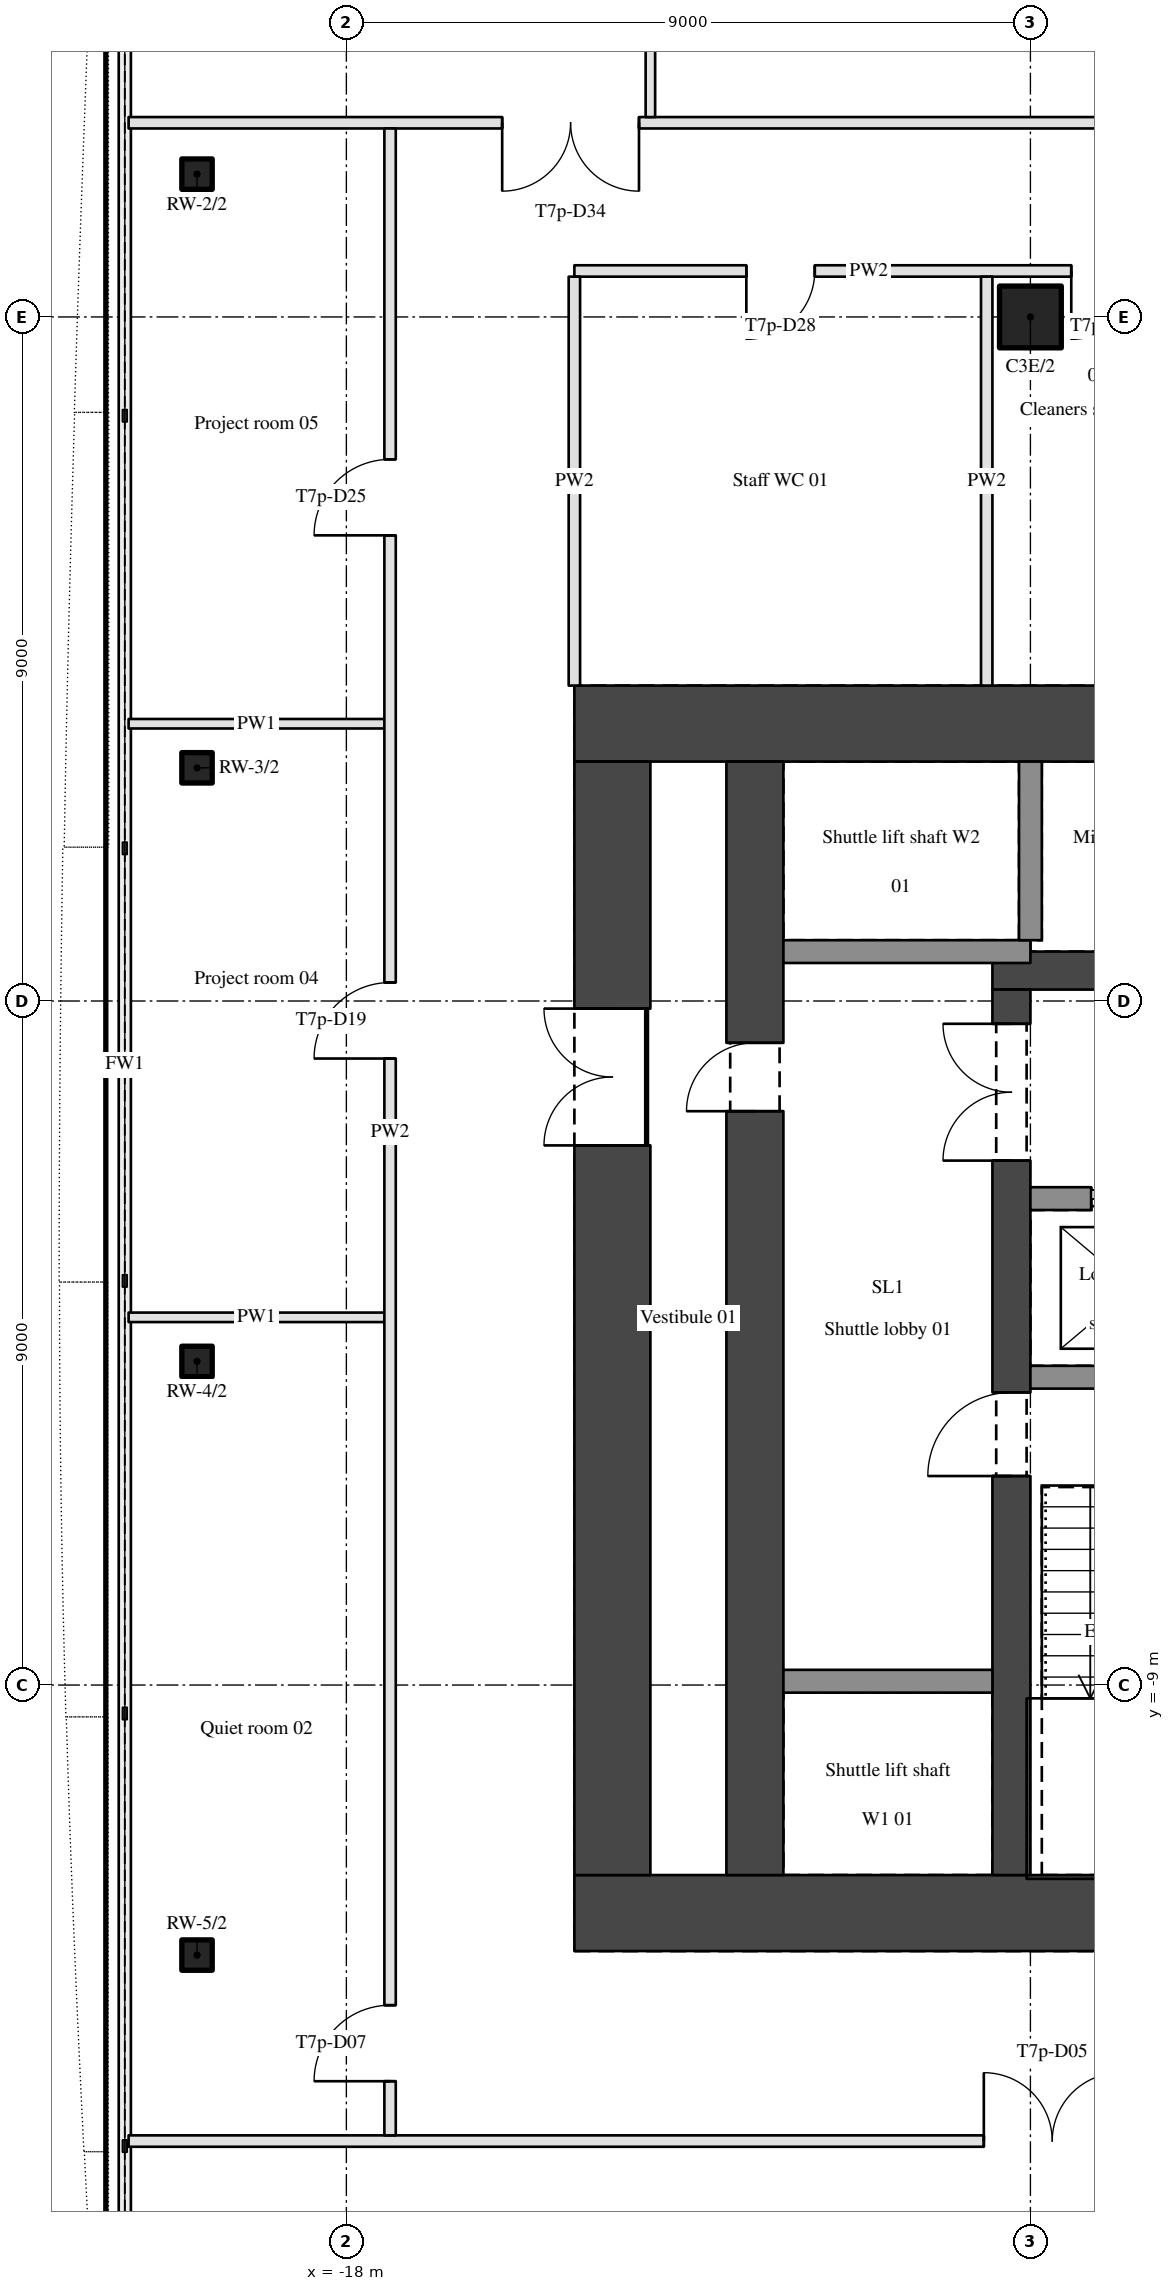
"""IFC4 building model, lengths in metres.
Left out: names, types, materials, properties, quantities, classifications, styles, units other than length and angle.
Written with IfcOpenShell. Run it as: python <this file> out.ifc"""

import sys

from ifc_helpers import new_model, si_unit, direction, frame, frame_2d, origin, origin_2d, place, context, subcontext, project, spatial, rectangle, hollow_rectangle, hollow_circle, extrude, element, fill, save


model = new_model("IFC4")
c1 = context("Model", 3, precision=1e-05, world=origin(), true_north=direction((0.0, 1.0)))
c2 = subcontext(c1, "Body", "Model", "MODEL_VIEW")
j1 = project(units=[si_unit("LENGTHUNIT", "METRE"), si_unit("PLANEANGLEUNIT", "RADIAN")], contexts=[c1])
p1 = place(None, origin())
s1 = spatial("IfcSite", under=j1, at=p1, CompositionType="ELEMENT")
p2 = place(p1, origin())
s2 = spatial("IfcBuilding", under=s1, at=p2, CompositionType="ELEMENT")
p3 = place(p2, frame((0.0, 0.0, 105.0)))
s3 = spatial("IfcBuildingStorey", under=s2, at=p3, CompositionType="ELEMENT", Elevation=105.0)
p4 = place(p3, frame((-9.0, 9.0, 0.0), z_axis=(0.0, 0.0, 1.0), x_axis=(1.0, 0.0, 0.0)))
e1 = element("IfcColumn", 1, at=p4, inside=s3, PredefinedType="COLUMN", context=c2, shape_type="SweptSolid", body=[
    extrude(hollow_circle(Radius=0.406, WallThickness=0.036, at=origin_2d()), origin(), (0.0, 0.0, 1.0), 3.9),
])
for number, where, z_axis, x_axis in (
    (2, (-19.965, 10.879, 0.0), (0.0, 0.0, 1.0), (1.0, 0.0, 0.0)),
    (3, (-19.965, 3.068, 0.0), (0.0, 0.0, 1.0), (1.0, 0.0, 0.0)),
    (4, (-19.965, -4.742, 0.0), (0.0, 0.0, 1.0), (1.0, 0.0, 0.0)),
    (5, (-19.965, -12.553, 0.0), (0.0, 0.0, 1.0), (1.0, 0.0, 0.0)),
):
    element("IfcColumn", number, at=place(p3, frame(where, z_axis=z_axis, x_axis=x_axis)), inside=s3, PredefinedType="COLUMN", context=c2, shape_type="SweptSolid", body=[
        extrude(hollow_rectangle(XDim=0.4, YDim=0.4, WallThickness=0.025, InnerFilletRadius=0.038, OuterFilletRadius=0.062, at=origin_2d()), origin(), (0.0, 0.0, 1.0), 3.9),
    ])
for number, where, z_axis, x_axis in (
    (6, (-15.0, -12.0, 0.0), (0.0, 0.0, 1.0), (1.0, 0.0, 0.0)),
    (7, (-15.0, 3.65, 0.0), (0.0, 0.0, 1.0), (1.0, 0.0, 0.0)),
):
    element("IfcWall", number, at=place(p3, frame(where, z_axis=z_axis, x_axis=x_axis)), inside=s3, PredefinedType="SHEAR", context=c2, shape_type="SweptSolid", body=[
        extrude(rectangle(XDim=30.0, YDim=1.0, at=frame_2d((15.0, 0.0))), origin(), (0.0, 0.0, 1.0), 3.9),
    ])
p5 = place(p3, frame((-14.5, -11.5, 0.0), z_axis=(0.0, 0.0, 1.0), x_axis=(0.0, 1.0, 0.0)))
e8 = element("IfcWall", 8, at=p5, inside=s3, PredefinedType="SHEAR", context=c2, shape_type="SweptSolid", body=[
    extrude(rectangle(XDim=14.65, YDim=1.0, at=frame_2d((7.325, 0.0))), origin(), (0.0, 0.0, 1.0), 3.9),
])
p6 = place(p5, frame((9.6, 0.0, 0.0)))
e9 = element("IfcOpeningElement", 9, at=p6, cuts=e8, PredefinedType="OPENING", context=c2, shape_type="SweptSolid", body=[
    extrude(rectangle(XDim=1.8, YDim=2.1, at=frame_2d((0.9, 1.05))), frame((0.0, 0.51, 0.0), z_axis=(0.0, -1.0, 0.0), x_axis=(1.0, 0.0, 0.0)), (0.0, 0.0, 1.0), 1.02),
])
p7 = place(p3, frame((-12.625, -11.5, 0.0), z_axis=(0.0, 0.0, 1.0), x_axis=(0.0, 1.0, 0.0)))
e10 = element("IfcWall", 10, at=p7, inside=s3, PredefinedType="SHEAR", context=c2, shape_type="SweptSolid", body=[
    extrude(rectangle(XDim=14.65, YDim=0.75, at=frame_2d((7.325, 0.0))), origin(), (0.0, 0.0, 1.0), 3.9),
])
p8 = place(p7, frame((10.05, 0.0, 0.0)))
e11 = element("IfcOpeningElement", 11, at=p8, cuts=e10, PredefinedType="OPENING", context=c2, shape_type="SweptSolid", body=[
    extrude(rectangle(XDim=0.9, YDim=2.1, at=frame_2d((0.45, 1.05))), frame((0.0, 0.385, 0.0), z_axis=(0.0, -1.0, 0.0), x_axis=(1.0, 0.0, 0.0)), (0.0, 0.0, 1.0), 0.77),
])
p9 = place(p3, frame((-9.5, 0.4, 0.0), z_axis=(0.0, 0.0, 1.0), x_axis=(1.0, 0.0, 0.0)))
e12 = element("IfcWall", 12, at=p9, inside=s3, PredefinedType="SHEAR", context=c2, shape_type="SweptSolid", body=[
    extrude(rectangle(XDim=19.0, YDim=0.5, at=frame_2d((9.5, 0.0))), origin(), (0.0, 0.0, 1.0), 3.9),
])
p10 = place(p3, frame((-9.25, -11.5, 0.0), z_axis=(0.0, 0.0, 1.0), x_axis=(0.0, 1.0, 0.0)))
e13 = element("IfcWall", 13, at=p10, inside=s3, PredefinedType="SHEAR", context=c2, shape_type="SweptSolid", body=[
    extrude(rectangle(XDim=11.65, YDim=0.5, at=frame_2d((5.825, 0.0))), origin(), (0.0, 0.0, 1.0), 3.9),
])
p11 = place(p10, frame((9.4, 0.0, 0.0)))
e14 = element("IfcOpeningElement", 14, at=p11, cuts=e13, PredefinedType="OPENING", context=c2, shape_type="SweptSolid", body=[
    extrude(rectangle(XDim=1.8, YDim=2.1, at=frame_2d((0.9, 1.05))), frame((0.0, 0.26, 0.0), z_axis=(0.0, -1.0, 0.0), x_axis=(1.0, 0.0, 0.0)), (0.0, 0.0, 1.0), 0.52),
])
p12 = place(p10, frame((5.25, 0.0, 0.0)))
e15 = element("IfcOpeningElement", 15, at=p12, cuts=e13, PredefinedType="OPENING", context=c2, shape_type="SweptSolid", body=[
    extrude(rectangle(XDim=1.1, YDim=2.1, at=frame_2d((0.55, 1.05))), frame((0.0, 0.26, 0.0), z_axis=(0.0, -1.0, 0.0), x_axis=(1.0, 0.0, 0.0)), (0.0, 0.0, 1.0), 0.52),
])
p13 = place(p3, frame((-20.865, -15.0, 0.0), z_axis=(0.0, 0.0, 1.0), x_axis=(1.0, 0.0, 0.0)))
e16 = element("IfcWall", 16, at=p13, inside=s3, PredefinedType="PARTITIONING", context=c2, shape_type="SweptSolid", body=[
    extrude(rectangle(XDim=47.73, YDim=0.15, at=frame_2d((23.865, 0.0))), origin(), (0.0, 0.0, 1.0), 2.96),
])
p14 = place(p13, frame((11.252, 0.0, 0.0)))
e17 = element("IfcOpeningElement", 17, at=p14, cuts=e16, PredefinedType="OPENING", context=c2, shape_type="SweptSolid", body=[
    extrude(rectangle(XDim=1.8, YDim=2.1, at=frame_2d((0.9, 1.05))), frame((0.0, 0.085, 0.0), z_axis=(0.0, -1.0, 0.0), x_axis=(1.0, 0.0, 0.0)), (0.0, 0.0, 1.0), 0.17),
])
p15 = place(p13, frame((28.678, 0.0, 0.0)))
e18 = element("IfcOpeningElement", 18, at=p15, cuts=e16, PredefinedType="OPENING", context=c2, shape_type="SweptSolid", body=[
    extrude(rectangle(XDim=1.8, YDim=2.1, at=frame_2d((0.9, 1.05))), frame((0.0, 0.085, 0.0), z_axis=(0.0, -1.0, 0.0), x_axis=(1.0, 0.0, 0.0)), (0.0, 0.0, 1.0), 0.17),
])
p16 = place(p3, frame((-12.25, -8.95, 0.0), z_axis=(0.0, 0.0, 1.0), x_axis=(1.0, 0.0, 0.0)))
e19 = element("IfcWall", 19, at=p16, inside=s3, PredefinedType="SHEAR", context=c2, shape_type="SweptSolid", body=[
    extrude(rectangle(XDim=2.75, YDim=0.3, at=frame_2d((1.375, 0.0))), origin(), (0.0, 0.0, 1.0), 3.9),
])
p17 = place(p3, frame((-9.0, -4.95, 0.0), z_axis=(0.0, 0.0, 1.0), x_axis=(1.0, 0.0, 0.0)))
e20 = element("IfcWall", 20, at=p17, inside=s3, PredefinedType="SHEAR", context=c2, shape_type="SweptSolid", body=[
    extrude(rectangle(XDim=8.1, YDim=0.3, at=frame_2d((4.05, 0.0))), origin(), (0.0, 0.0, 1.0), 3.9),
])
p18 = place(p3, frame((-20.865, -4.162, 0.0), z_axis=(0.0, 0.0, 1.0), x_axis=(1.0, 0.0, 0.0)))
e21 = element("IfcWall", 21, at=p18, inside=s3, PredefinedType="PARTITIONING", context=c2, shape_type="SweptSolid", body=[
    extrude(rectangle(XDim=3.365, YDim=0.125, at=frame_2d((1.683, 0.0))), origin(), (0.0, 0.0, 1.0), 2.96),
])
p19 = place(p3, frame((-9.0, -2.6, 0.0), z_axis=(0.0, 0.0, 1.0), x_axis=(1.0, 0.0, 0.0)))
e22 = element("IfcWall", 22, at=p19, inside=s3, PredefinedType="SHEAR", context=c2, shape_type="SweptSolid", body=[
    extrude(rectangle(XDim=8.1, YDim=0.3, at=frame_2d((4.05, 0.0))), origin(), (0.0, 0.0, 1.0), 3.9),
])
p20 = place(p19, frame((0.8, 0.0, 0.0)))
e23 = element("IfcOpeningElement", 23, at=p20, cuts=e22, PredefinedType="OPENING", context=c2, shape_type="SweptSolid", body=[
    extrude(rectangle(XDim=1.1, YDim=2.1, at=frame_2d((0.55, 1.05))), frame((0.0, 0.16, 0.0), z_axis=(0.0, -1.0, 0.0), x_axis=(1.0, 0.0, 0.0)), (0.0, 0.0, 1.0), 0.32),
])
p21 = place(p19, frame((3.5, 0.0, 0.0)))
e24 = element("IfcOpeningElement", 24, at=p21, cuts=e22, PredefinedType="OPENING", context=c2, shape_type="SweptSolid", body=[
    extrude(rectangle(XDim=1.1, YDim=2.1, at=frame_2d((0.55, 1.05))), frame((0.0, 0.16, 0.0), z_axis=(0.0, -1.0, 0.0), x_axis=(1.0, 0.0, 0.0)), (0.0, 0.0, 1.0), 0.32),
])
p22 = place(p19, frame((6.2, 0.0, 0.0)))
e25 = element("IfcOpeningElement", 25, at=p22, cuts=e22, PredefinedType="OPENING", context=c2, shape_type="SweptSolid", body=[
    extrude(rectangle(XDim=1.1, YDim=2.1, at=frame_2d((0.55, 1.05))), frame((0.0, 0.16, 0.0), z_axis=(0.0, -1.0, 0.0), x_axis=(1.0, 0.0, 0.0)), (0.0, 0.0, 1.0), 0.32),
])
p23 = place(p3, frame((-9.0, 0.65, 0.0), z_axis=(0.0, 0.0, 1.0), x_axis=(-1.0, 0.0, 0.0)))
e26 = element("IfcWall", 26, at=p23, inside=s3, PredefinedType="SHEAR", context=c2, shape_type="SweptSolid", body=[
    extrude(rectangle(XDim=3.25, YDim=0.3, at=frame_2d((1.625, 0.0))), origin(), (0.0, 0.0, 1.0), 3.9),
])
p24 = place(p3, frame((-20.865, 3.648, 0.0), z_axis=(0.0, 0.0, 1.0), x_axis=(1.0, 0.0, 0.0)))
e27 = element("IfcWall", 27, at=p24, inside=s3, PredefinedType="PARTITIONING", context=c2, shape_type="SweptSolid", body=[
    extrude(rectangle(XDim=3.365, YDim=0.125, at=frame_2d((1.683, 0.0))), origin(), (0.0, 0.0, 1.0), 2.96),
])
p25 = place(p3, frame((-7.25, 9.605, 0.0), z_axis=(0.0, 0.0, 1.0), x_axis=(-1.0, 0.0, 0.0)))
e28 = element("IfcWall", 28, at=p25, inside=s3, PredefinedType="PARTITIONING", context=c2, shape_type="SweptSolid", body=[
    extrude(rectangle(XDim=7.75, YDim=0.15, at=frame_2d((3.875, 0.0))), origin(), (0.0, 0.0, 1.0), 2.96),
])
p26 = place(p25, frame((0.312, 0.0, 0.0)))
e29 = element("IfcOpeningElement", 29, at=p26, cuts=e28, PredefinedType="OPENING", context=c2, shape_type="SweptSolid", body=[
    extrude(rectangle(XDim=0.9, YDim=2.1, at=frame_2d((0.45, 1.05))), frame((0.0, 0.085, 0.0), z_axis=(0.0, -1.0, 0.0), x_axis=(1.0, 0.0, 0.0)), (0.0, 0.0, 1.0), 0.17),
])
p27 = place(p25, frame((4.587, 0.0, 0.0)))
e30 = element("IfcOpeningElement", 30, at=p27, cuts=e28, PredefinedType="OPENING", context=c2, shape_type="SweptSolid", body=[
    extrude(rectangle(XDim=0.9, YDim=2.1, at=frame_2d((0.45, 1.05))), frame((0.0, 0.085, 0.0), z_axis=(0.0, -1.0, 0.0), x_axis=(1.0, 0.0, 0.0)), (0.0, 0.0, 1.0), 0.17),
])
p28 = place(p3, frame((26.865, 11.555, 0.0), z_axis=(0.0, 0.0, 1.0), x_axis=(-1.0, 0.0, 0.0)))
e31 = element("IfcWall", 31, at=p28, inside=s3, PredefinedType="PARTITIONING", context=c2, shape_type="SweptSolid", body=[
    extrude(rectangle(XDim=47.73, YDim=0.15, at=frame_2d((23.865, 0.0))), origin(), (0.0, 0.0, 1.0), 2.96),
])
p29 = place(p28, frame((41.015, 0.0, 0.0)))
e32 = element("IfcOpeningElement", 32, at=p29, cuts=e31, PredefinedType="OPENING", context=c2, shape_type="SweptSolid", body=[
    extrude(rectangle(XDim=1.8, YDim=2.1, at=frame_2d((0.9, 1.05))), frame((0.0, 0.085, 0.0), z_axis=(0.0, -1.0, 0.0), x_axis=(1.0, 0.0, 0.0)), (0.0, 0.0, 1.0), 0.17),
])
p30 = place(p28, frame((21.015, 0.0, 0.0)))
e33 = element("IfcOpeningElement", 33, at=p30, cuts=e31, PredefinedType="OPENING", context=c2, shape_type="SweptSolid", body=[
    extrude(rectangle(XDim=1.8, YDim=2.1, at=frame_2d((0.9, 1.05))), frame((0.0, 0.085, 0.0), z_axis=(0.0, -1.0, 0.0), x_axis=(1.0, 0.0, 0.0)), (0.0, 0.0, 1.0), 0.17),
])
p31 = place(p3, frame((-17.425, -14.925, 0.0), z_axis=(0.0, 0.0, 1.0), x_axis=(0.0, 1.0, 0.0)))
e34 = element("IfcWall", 34, at=p31, inside=s3, PredefinedType="PARTITIONING", context=c2, shape_type="SweptSolid", body=[
    extrude(rectangle(XDim=26.405, YDim=0.15, at=frame_2d((13.203, 0.0))), origin(), (0.0, 0.0, 1.0), 2.96),
])
p32 = place(p31, frame((0.712, 0.0, 0.0)))
e35 = element("IfcOpeningElement", 35, at=p32, cuts=e34, PredefinedType="OPENING", context=c2, shape_type="SweptSolid", body=[
    extrude(rectangle(XDim=1.0, YDim=2.1, at=frame_2d((0.5, 1.05))), frame((0.0, 0.085, 0.0), z_axis=(0.0, -1.0, 0.0), x_axis=(1.0, 0.0, 0.0)), (0.0, 0.0, 1.0), 0.17),
])
p33 = place(p31, frame((14.168, 0.0, 0.0)))
e36 = element("IfcOpeningElement", 36, at=p33, cuts=e34, PredefinedType="OPENING", context=c2, shape_type="SweptSolid", body=[
    extrude(rectangle(XDim=1.0, YDim=2.1, at=frame_2d((0.5, 1.05))), frame((0.0, 0.085, 0.0), z_axis=(0.0, -1.0, 0.0), x_axis=(1.0, 0.0, 0.0)), (0.0, 0.0, 1.0), 0.17),
])
p34 = place(p31, frame((21.052, 0.0, 0.0)))
e37 = element("IfcOpeningElement", 37, at=p34, cuts=e34, PredefinedType="OPENING", context=c2, shape_type="SweptSolid", body=[
    extrude(rectangle(XDim=1.0, YDim=2.1, at=frame_2d((0.5, 1.05))), frame((0.0, 0.085, 0.0), z_axis=(0.0, -1.0, 0.0), x_axis=(1.0, 0.0, 0.0)), (0.0, 0.0, 1.0), 0.17),
])
p35 = place(p3, frame((-15.0, 4.15, 0.0), z_axis=(0.0, 0.0, 1.0), x_axis=(0.0, 1.0, 0.0)))
e38 = element("IfcWall", 38, at=p35, inside=s3, PredefinedType="PARTITIONING", context=c2, shape_type="SweptSolid", body=[
    extrude(rectangle(XDim=5.38, YDim=0.15, at=frame_2d((2.69, 0.0))), origin(), (0.0, 0.0, 1.0), 2.96),
])
p36 = place(p3, frame((-14.0, 11.63, 0.0), z_axis=(0.0, 0.0, 1.0), x_axis=(0.0, 1.0, 0.0)))
e39 = element("IfcWall", 39, at=p36, inside=s3, PredefinedType="PARTITIONING", context=c2, shape_type="SweptSolid", body=[
    extrude(rectangle(XDim=4.263, YDim=0.125, at=frame_2d((2.131, 0.0))), origin(), (0.0, 0.0, 1.0), 2.96),
])
p37 = place(p3, frame((-9.575, 4.15, 0.0), z_axis=(0.0, 0.0, 1.0), x_axis=(0.0, 1.0, 0.0)))
e40 = element("IfcWall", 40, at=p37, inside=s3, PredefinedType="PARTITIONING", context=c2, shape_type="SweptSolid", body=[
    extrude(rectangle(XDim=5.38, YDim=0.15, at=frame_2d((2.69, 0.0))), origin(), (0.0, 0.0, 1.0), 2.96),
])
p38 = place(p3, frame((-9.0, 0.8, 0.0), z_axis=(0.0, 0.0, 1.0), x_axis=(0.0, 1.0, 0.0)))
e41 = element("IfcWall", 41, at=p38, inside=s3, PredefinedType="SHEAR", context=c2, shape_type="SweptSolid", body=[
    extrude(rectangle(XDim=2.35, YDim=0.3, at=frame_2d((1.175, 0.0))), origin(), (0.0, 0.0, 1.0), 3.9),
])
p39 = place(p29, origin())
e42 = element("IfcDoor", 42, at=p39, inside=s3, OperationType="DOUBLE_DOOR_SINGLE_SWING", PredefinedType="DOOR", context=c2, shape_type="SweptSolid", body=[
    extrude(rectangle(XDim=1.8, YDim=2.1, at=frame_2d((0.9, 1.05))), frame((0.0, 0.025, 0.0), z_axis=(0.0, -1.0, 0.0), x_axis=(1.0, 0.0, 0.0)), (0.0, 0.0, 1.0), 0.05),
])
fill(e32, e42)
p40 = place(p14, origin())
e43 = element("IfcDoor", 43, at=p40, inside=s3, OperationType="DOUBLE_DOOR_SINGLE_SWING", PredefinedType="DOOR", context=c2, shape_type="SweptSolid", body=[
    extrude(rectangle(XDim=1.8, YDim=2.1, at=frame_2d((0.9, 1.05))), frame((0.0, 0.025, 0.0), z_axis=(0.0, -1.0, 0.0), x_axis=(1.0, 0.0, 0.0)), (0.0, 0.0, 1.0), 0.05),
])
fill(e17, e43)
p41 = place(p6, origin())
e44 = element("IfcDoor", 44, at=p41, inside=s3, OperationType="DOUBLE_DOOR_SINGLE_SWING", PredefinedType="DOOR", context=c2, shape_type="SweptSolid", body=[
    extrude(rectangle(XDim=1.8, YDim=2.1, at=frame_2d((0.9, 1.05))), frame((0.0, 0.025, 0.0), z_axis=(0.0, -1.0, 0.0), x_axis=(1.0, 0.0, 0.0)), (0.0, 0.0, 1.0), 0.05),
])
fill(e9, e44)
p42 = place(p11, origin())
e45 = element("IfcDoor", 45, at=p42, inside=s3, OperationType="DOUBLE_DOOR_SINGLE_SWING", PredefinedType="DOOR", context=c2, shape_type="SweptSolid", body=[
    extrude(rectangle(XDim=1.8, YDim=2.1, at=frame_2d((0.9, 1.05))), frame((0.0, 0.025, 0.0), z_axis=(0.0, -1.0, 0.0), x_axis=(1.0, 0.0, 0.0)), (0.0, 0.0, 1.0), 0.05),
])
fill(e14, e45)
p43 = place(p12, origin())
e46 = element("IfcDoor", 46, at=p43, inside=s3, OperationType="SINGLE_SWING_LEFT", PredefinedType="DOOR", context=c2, shape_type="SweptSolid", body=[
    extrude(rectangle(XDim=1.1, YDim=2.1, at=frame_2d((0.55, 1.05))), frame((0.0, 0.025, 0.0), z_axis=(0.0, -1.0, 0.0), x_axis=(1.0, 0.0, 0.0)), (0.0, 0.0, 1.0), 0.05),
])
fill(e15, e46)
p44 = place(p26, origin())
e47 = element("IfcDoor", 47, at=p44, inside=s3, OperationType="SINGLE_SWING_RIGHT", PredefinedType="DOOR", context=c2, shape_type="SweptSolid", body=[
    extrude(rectangle(XDim=0.9, YDim=2.1, at=frame_2d((0.45, 1.05))), frame((0.0, 0.025, 0.0), z_axis=(0.0, -1.0, 0.0), x_axis=(1.0, 0.0, 0.0)), (0.0, 0.0, 1.0), 0.05),
])
fill(e29, e47)
p45 = place(p32, origin())
e48 = element("IfcDoor", 48, at=p45, inside=s3, OperationType="SINGLE_SWING_LEFT", PredefinedType="DOOR", context=c2, shape_type="SweptSolid", body=[
    extrude(rectangle(XDim=1.0, YDim=2.1, at=frame_2d((0.5, 1.05))), frame((0.0, 0.025, 0.0), z_axis=(0.0, -1.0, 0.0), x_axis=(1.0, 0.0, 0.0)), (0.0, 0.0, 1.0), 0.05),
])
fill(e35, e48)
p46 = place(p33, origin())
e49 = element("IfcDoor", 49, at=p46, inside=s3, OperationType="SINGLE_SWING_LEFT", PredefinedType="DOOR", context=c2, shape_type="SweptSolid", body=[
    extrude(rectangle(XDim=1.0, YDim=2.1, at=frame_2d((0.5, 1.05))), frame((0.0, 0.025, 0.0), z_axis=(0.0, -1.0, 0.0), x_axis=(1.0, 0.0, 0.0)), (0.0, 0.0, 1.0), 0.05),
])
fill(e36, e49)
p47 = place(p34, origin())
e50 = element("IfcDoor", 50, at=p47, inside=s3, OperationType="SINGLE_SWING_LEFT", PredefinedType="DOOR", context=c2, shape_type="SweptSolid", body=[
    extrude(rectangle(XDim=1.0, YDim=2.1, at=frame_2d((0.5, 1.05))), frame((0.0, 0.025, 0.0), z_axis=(0.0, -1.0, 0.0), x_axis=(1.0, 0.0, 0.0)), (0.0, 0.0, 1.0), 0.05),
])
fill(e37, e50)
p48 = place(p27, origin())
e51 = element("IfcDoor", 51, at=p48, inside=s3, OperationType="SINGLE_SWING_RIGHT", PredefinedType="DOOR", context=c2, shape_type="SweptSolid", body=[
    extrude(rectangle(XDim=0.9, YDim=2.1, at=frame_2d((0.45, 1.05))), frame((0.0, 0.025, 0.0), z_axis=(0.0, -1.0, 0.0), x_axis=(1.0, 0.0, 0.0)), (0.0, 0.0, 1.0), 0.05),
])
fill(e30, e51)
p49 = place(p8, origin())
e52 = element("IfcDoor", 52, at=p49, inside=s3, OperationType="SINGLE_SWING_LEFT", PredefinedType="DOOR", context=c2, shape_type="SweptSolid", body=[
    extrude(rectangle(XDim=0.9, YDim=2.1, at=frame_2d((0.45, 1.05))), frame((0.0, 0.025, 0.0), z_axis=(0.0, -1.0, 0.0), x_axis=(1.0, 0.0, 0.0)), (0.0, 0.0, 1.0), 0.05),
])
fill(e11, e52)
p50 = place(p20, origin())
e53 = element("IfcDoor", 53, at=p50, inside=s3, OperationType="DOUBLE_DOOR_SLIDING", PredefinedType="DOOR", context=c2, shape_type="SweptSolid", body=[
    extrude(rectangle(XDim=1.1, YDim=2.1, at=frame_2d((0.55, 1.05))), frame((0.0, 0.025, 0.0), z_axis=(0.0, -1.0, 0.0), x_axis=(1.0, 0.0, 0.0)), (0.0, 0.0, 1.0), 0.05),
])
fill(e23, e53)
save(model, sys.argv[1])
